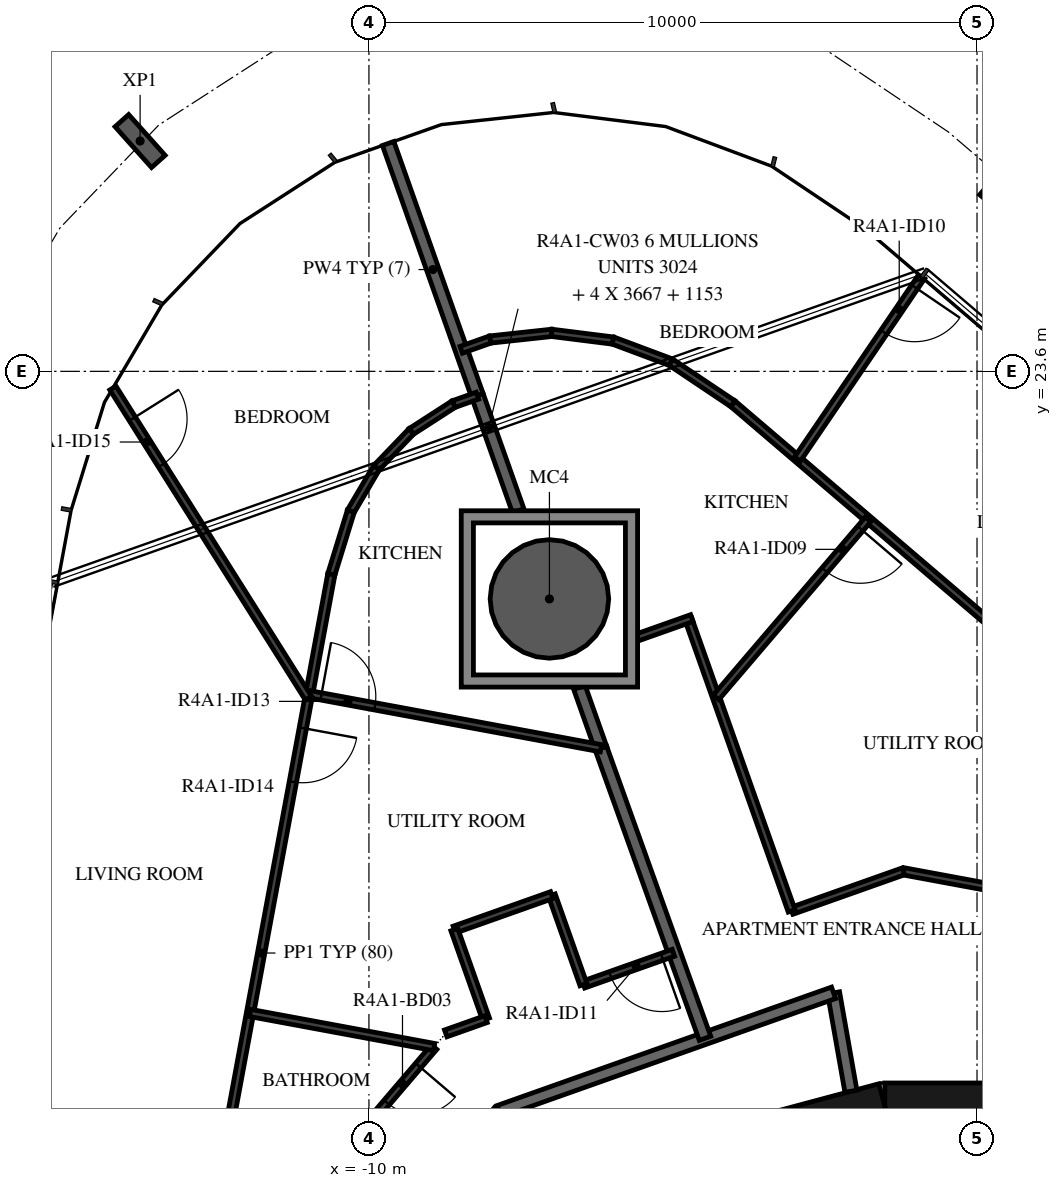
"""IFC4 building model, lengths in metres.
Left out: names, types, materials, properties, quantities, classifications, styles, units other than length and angle.
Written with IfcOpenShell. Run it as: python <this file> out.ifc"""

import sys

from ifc_helpers import new_model, si_unit, direction, frame, frame_2d, origin, origin_2d, place, context, subcontext, project, spatial, polyline, rectangle, hollow_circle, i_section, outline, extrude, element, fill, save


model = new_model("IFC4")
c1 = context("Model", 3, precision=1e-05, world=origin(), true_north=direction((0.0, 1.0)))
c2 = subcontext(c1, "Body", "Model", "MODEL_VIEW")
j1 = project(units=[si_unit("LENGTHUNIT", "METRE"), si_unit("PLANEANGLEUNIT", "RADIAN")], contexts=[c1])
p1 = place(None, origin())
s1 = spatial("IfcSite", under=j1, at=p1, CompositionType="ELEMENT")
p2 = place(p1, origin())
s2 = spatial("IfcBuilding", under=s1, at=p2, CompositionType="ELEMENT")
p3 = place(p2, frame((0.0, 0.0, 155.2)))
s3 = spatial("IfcBuildingStorey", under=s2, at=p3, CompositionType="ELEMENT", Elevation=155.2)
p4 = place(p3, frame((-7.032, 19.858, -0.38), z_axis=(0.0, 0.0, 1.0), x_axis=(1.0, 0.0, 0.0)))
e1 = element("IfcColumn", 1, at=p4, inside=s3, PredefinedType="COLUMN", context=c2, shape_type="SweptSolid", body=[
    extrude(hollow_circle(Radius=0.975, WallThickness=0.045, at=origin_2d()), origin(), (0.0, 0.0, 1.0), 3.5),
])
for number, where, z_axis, x_axis in (
    (2, (0.45, 26.75, -0.38), (0.0, 0.0, 1.0), (0.76, -0.649, 0.0)),
    (3, (-13.763, 27.387, -0.38), (0.0, 0.0, 1.0), (0.746, 0.666, 0.0)),
):
    element("IfcColumn", number, at=place(p3, frame(where, z_axis=z_axis, x_axis=x_axis)), inside=s3, PredefinedType="COLUMN", context=c2, shape_type="SweptSolid", body=[
        extrude(i_section(OverallWidth=0.3, OverallDepth=0.9, WebThickness=0.019, FlangeThickness=0.035, FilletRadius=0.03, at=origin_2d()), origin(), (0.0, 0.0, 1.0), 3.5),
    ])
for number, where, z_axis, x_axis in (
    (4, (1.516, 11.647, 0.0), (0.0, 0.0, 1.0), (-1.0, 0.0, 0.0)),
    (5, (-1.55, 11.643, 0.0), (0.0, 0.0, 1.0), (-0.966, -0.259, 0.0)),
):
    element("IfcWall", number, at=place(p3, frame(where, z_axis=z_axis, x_axis=x_axis)), inside=s3, PredefinedType="SHEAR", context=c2, shape_type="SweptSolid", body=[
        extrude(rectangle(XDim=3.033, YDim=0.5, at=frame_2d((1.516, 0.0))), origin(), (0.0, 0.0, 1.0), 3.12),
    ])
p5 = place(p3, frame((-2.074, 11.761, 0.0), z_axis=(0.0, 0.0, 1.0), x_axis=(-0.1736412798, 0.984808969267, 0.0)))
e6 = element("IfcWall", 6, at=p5, inside=s3, PredefinedType="STANDARD", context=c2, shape_type="SweptSolid", body=[
    extrude(rectangle(XDim=1.644, YDim=0.2, at=frame_2d((0.822, 0.0))), origin(), (0.0, 0.0, 1.0), 3.12),
])
p6 = place(p3, frame((-2.359, 13.38, 0.0), z_axis=(0.0, 0.0, 1.0), x_axis=(-0.942647529236, -0.333789807551, 0.0)))
e7 = element("IfcWall", 7, at=p6, inside=s3, PredefinedType="STANDARD", context=c2, shape_type="SweptSolid", body=[
    extrude(rectangle(XDim=5.833, YDim=0.2, at=frame_2d((2.917, 0.0))), origin(), (0.0, 0.0, 1.0), 3.12),
])
p7 = place(p3, frame((-7.858, 11.433, 0.0), z_axis=(0.0, 0.0, 1.0), x_axis=(-0.649440801937, -0.760412154545, 0.0)))
e8 = element("IfcWall", 8, at=p7, inside=s3, PredefinedType="STANDARD", context=c2, shape_type="SweptSolid", body=[
    extrude(rectangle(XDim=7.181, YDim=0.2, at=frame_2d((3.59, 0.0))), origin(), (0.0, 0.0, 1.0), 3.12),
])
p8 = place(p7, frame((2.6, 0.0, 0.0)))
e9 = element("IfcOpeningElement", 9, at=p8, cuts=e8, PredefinedType="OPENING", context=c2, shape_type="SweptSolid", body=[
    extrude(rectangle(XDim=1.0, YDim=2.1, at=frame_2d((0.5, 1.05))), frame((0.0, 0.11, 0.0), z_axis=(0.0, -1.0, 0.0), x_axis=(1.0, 0.0, 0.0)), (0.0, 0.0, 1.0), 0.22),
])
p9 = place(p3, frame((-6.185, 17.402, 0.0), z_axis=(0.0, 0.0, 1.0), x_axis=(0.337736730281, -0.941240618024, 0.0)))
e10 = element("IfcWall", 10, at=p9, inside=s3, PredefinedType="STANDARD", context=c2, shape_type="SweptSolid", body=[
    extrude(rectangle(XDim=5.068, YDim=0.2, at=frame_2d((2.534, 0.0))), origin(), (0.0, 0.0, 1.0), 3.12),
])
p10 = place(p3, frame((-6.539, 18.403, 0.0), z_axis=(0.0, 0.0, 1.0), x_axis=(0.333625806098, -0.942705585804, 0.0)))
e11 = element("IfcWall", 11, at=p10, inside=s3, PredefinedType="STANDARD", context=c2, shape_type="SweptSolid", body=[
    extrude(rectangle(XDim=1.062, YDim=0.2, at=frame_2d((0.531, 0.0))), origin(), (0.0, 0.0, 1.0), 3.12),
])
p11 = place(p3, frame((-9.684, 27.348, 0.0), z_axis=(0.0, 0.0, 1.0), x_axis=(0.333818381408, -0.942637410797, 0.0)))
e12 = element("IfcWall", 12, at=p11, inside=s3, PredefinedType="STANDARD", context=c2, shape_type="SweptSolid", body=[
    extrude(rectangle(XDim=4.4, YDim=0.2, at=frame_2d((2.2, 0.0))), origin(), (0.0, 0.0, 1.0), 3.12),
])
p12 = place(p3, frame((-8.216, 23.2, 0.0), z_axis=(0.0, 0.0, 1.0), x_axis=(0.333793117913, -0.942646357036, 0.0)))
e13 = element("IfcWall", 13, at=p12, inside=s3, PredefinedType="STANDARD", context=c2, shape_type="SweptSolid", body=[
    extrude(rectangle(XDim=2.008, YDim=0.2, at=frame_2d((1.004, 0.0))), origin(), (0.0, 0.0, 1.0), 3.12),
])
p13 = place(p3, frame((8.702, 12.206, 0.0), z_axis=(0.0, 0.0, 1.0), x_axis=(-0.760401313718, 0.649453494945, 0.0)))
e14 = element("IfcWall", 14, at=p13, inside=s3, PredefinedType="PARTITIONING", context=c2, shape_type="SweptSolid", body=[
    extrude(rectangle(XDim=16.724, YDim=0.12, at=frame_2d((8.362, 0.0))), origin(), (0.0, 0.0, 1.0), 3.12),
])
p14 = place(p13, frame((0.2, 0.0, 0.0)))
e15 = element("IfcOpeningElement", 15, at=p14, cuts=e14, PredefinedType="OPENING", context=c2, shape_type="SweptSolid", body=[
    extrude(rectangle(XDim=0.9, YDim=2.1, at=frame_2d((0.45, 1.05))), frame((0.0, 0.07, 0.0), z_axis=(0.0, -1.0, 0.0), x_axis=(1.0, 0.0, 0.0)), (0.0, 0.0, 1.0), 0.14),
])
p15 = place(p13, frame((7.099, 0.0, 0.0)))
e16 = element("IfcOpeningElement", 16, at=p15, cuts=e14, PredefinedType="OPENING", context=c2, shape_type="SweptSolid", body=[
    extrude(rectangle(XDim=0.9, YDim=2.1, at=frame_2d((0.45, 1.05))), frame((0.0, 0.07, 0.0), z_axis=(0.0, -1.0, 0.0), x_axis=(1.0, 0.0, 0.0)), (0.0, 0.0, 1.0), 0.14),
])
p16 = place(p3, frame((6.641, 13.923, 0.0), z_axis=(0.0, 0.0, 1.0), x_axis=(-0.983250157272, 0.182261153912, 0.0)))
e17 = element("IfcWall", 17, at=p16, inside=s3, PredefinedType="PARTITIONING", context=c2, shape_type="SweptSolid", body=[
    extrude(rectangle(XDim=7.985, YDim=0.12, at=frame_2d((3.992, 0.0))), origin(), (0.0, 0.0, 1.0), 3.12),
])
p17 = place(p16, frame((1.4, 0.0, 0.0)))
e18 = element("IfcOpeningElement", 18, at=p17, cuts=e17, PredefinedType="OPENING", context=c2, shape_type="SweptSolid", body=[
    extrude(rectangle(XDim=0.8, YDim=2.1, at=frame_2d((0.4, 1.05))), frame((0.0, 0.07, 0.0), z_axis=(0.0, -1.0, 0.0), x_axis=(1.0, 0.0, 0.0)), (0.0, 0.0, 1.0), 0.14),
])
p18 = place(p16, frame((5.069, 0.0, 0.0)))
e19 = element("IfcOpeningElement", 19, at=p18, cuts=e17, PredefinedType="OPENING", context=c2, shape_type="SweptSolid", body=[
    extrude(rectangle(XDim=0.9, YDim=2.1, at=frame_2d((0.45, 1.05))), frame((0.0, 0.07, 0.0), z_axis=(0.0, -1.0, 0.0), x_axis=(1.0, 0.0, 0.0)), (0.0, 0.0, 1.0), 0.14),
])
p19 = place(p3, frame((-1.21, 15.378, 0.0), z_axis=(0.0, 0.0, 1.0), x_axis=(-0.942633792474, -0.333828598663, 0.0)))
e20 = element("IfcWall", 20, at=p19, inside=s3, PredefinedType="PARTITIONING", context=c2, shape_type="SweptSolid", body=[
    extrude(rectangle(XDim=1.95, YDim=0.12, at=frame_2d((0.975, 0.0))), origin(), (0.0, 0.0, 1.0), 3.12),
])
p20 = place(p3, frame((-3.048, 14.727, 0.0), z_axis=(0.0, 0.0, 1.0), x_axis=(-0.333811603187, 0.942639811157, 0.0)))
e21 = element("IfcWall", 21, at=p20, inside=s3, PredefinedType="PARTITIONING", context=c2, shape_type="SweptSolid", body=[
    extrude(rectangle(XDim=5.087, YDim=0.12, at=frame_2d((2.543, 0.0))), origin(), (0.0, 0.0, 1.0), 3.12),
])
p21 = place(p3, frame((-4.689, 19.542, 0.0), z_axis=(0.0, 0.0, 1.0), x_axis=(-0.942661851862, -0.33374935662, 0.0)))
e22 = element("IfcWall", 22, at=p21, inside=s3, PredefinedType="PARTITIONING", context=c2, shape_type="SweptSolid", body=[
    extrude(rectangle(XDim=1.017, YDim=0.12, at=frame_2d((0.508, 0.0))), origin(), (0.0, 0.0, 1.0), 3.12),
])
p22 = place(p3, frame((-0.914, 25.153, 0.0), z_axis=(0.0, 0.0, 1.0), x_axis=(-0.56264004133, -0.826701992191, 0.0)))
e23 = element("IfcWall", 23, at=p22, inside=s3, PredefinedType="PARTITIONING", context=c2, shape_type="SweptSolid", body=[
    extrude(rectangle(XDim=3.622, YDim=0.12, at=frame_2d((1.811, 0.0))), origin(), (0.0, 0.0, 1.0), 2.73),
])
p23 = place(p22, frame((0.2, 0.0, 0.0)))
e24 = element("IfcOpeningElement", 24, at=p23, cuts=e23, PredefinedType="OPENING", context=c2, shape_type="SweptSolid", body=[
    extrude(rectangle(XDim=0.9, YDim=2.1, at=frame_2d((0.45, 1.05))), frame((0.0, 0.07, 0.0), z_axis=(0.0, -1.0, 0.0), x_axis=(1.0, 0.0, 0.0)), (0.0, 0.0, 1.0), 0.14),
])
p24 = place(p3, frame((-1.79, 21.167, 0.0), z_axis=(0.0, 0.0, 1.0), x_axis=(-0.649427819186, -0.760423242456, 0.0)))
e25 = element("IfcWall", 25, at=p24, inside=s3, PredefinedType="PARTITIONING", context=c2, shape_type="SweptSolid", body=[
    extrude(rectangle(XDim=3.851, YDim=0.12, at=frame_2d((1.926, 0.0))), origin(), (0.0, 0.0, 1.0), 3.12),
])
p25 = place(p24, frame((0.2, 0.0, 0.0)))
e26 = element("IfcOpeningElement", 26, at=p25, cuts=e25, PredefinedType="OPENING", context=c2, shape_type="SweptSolid", body=[
    extrude(rectangle(XDim=0.9, YDim=2.1, at=frame_2d((0.45, 1.05))), frame((0.0, 0.07, 0.0), z_axis=(0.0, -1.0, 0.0), x_axis=(1.0, 0.0, 0.0)), (0.0, 0.0, 1.0), 0.14),
])
p26 = place(p3, frame((-8.483, 23.954, 0.0), z_axis=(0.0, 0.0, 1.0), x_axis=(0.942554725445, 0.334051776738, 0.0)))
e27 = element("IfcWall", 27, at=p26, inside=s3, PredefinedType="PARTITIONING", context=c2, shape_type="SweptSolid", body=[
    extrude(rectangle(XDim=0.508, YDim=0.12, at=frame_2d((0.254, 0.0))), origin(), (0.0, 0.0, 1.0), 3.12),
])
p27 = place(p3, frame((-8.004, 24.124, 0.0), z_axis=(0.0, 0.0, 1.0), x_axis=(0.994216064839, 0.107398400431, 0.0)))
e28 = element("IfcWall", 28, at=p27, inside=s3, PredefinedType="PARTITIONING", context=c2, shape_type="SweptSolid", body=[
    extrude(rectangle(XDim=1.016, YDim=0.12, at=frame_2d((0.508, 0.0))), origin(), (0.0, 0.0, 1.0), 3.12),
])
p28 = place(p3, frame((-6.994, 24.233, 0.0), z_axis=(0.0, 0.0, 1.0), x_axis=(0.992188875952, -0.124744676991, 0.0)))
e29 = element("IfcWall", 29, at=p28, inside=s3, PredefinedType="PARTITIONING", context=c2, shape_type="SweptSolid", body=[
    extrude(rectangle(XDim=1.016, YDim=0.12, at=frame_2d((0.508, 0.0))), origin(), (0.0, 0.0, 1.0), 3.12),
])
p29 = place(p3, frame((-5.986, 24.106, 0.0), z_axis=(0.0, 0.0, 1.0), x_axis=(0.936625084254, -0.350333343469, 0.0)))
e30 = element("IfcWall", 30, at=p29, inside=s3, PredefinedType="PARTITIONING", context=c2, shape_type="SweptSolid", body=[
    extrude(rectangle(XDim=1.016, YDim=0.12, at=frame_2d((0.508, 0.0))), origin(), (0.0, 0.0, 1.0), 3.12),
])
p30 = place(p3, frame((-5.034, 23.75, 0.0), z_axis=(0.0, 0.0, 1.0), x_axis=(0.83070096574, -0.556718874764, 0.0)))
e31 = element("IfcWall", 31, at=p30, inside=s3, PredefinedType="PARTITIONING", context=c2, shape_type="SweptSolid", body=[
    extrude(rectangle(XDim=1.227, YDim=0.12, at=frame_2d((0.614, 0.0))), origin(), (0.0, 0.0, 1.0), 3.12),
])
p31 = place(p3, frame((-4.993, 14.038, 0.0), z_axis=(0.0, 0.0, 1.0), x_axis=(-0.942685371668, -0.333682918418, 0.0)))
e32 = element("IfcWall", 32, at=p31, inside=s3, PredefinedType="PARTITIONING", context=c2, shape_type="SweptSolid", body=[
    extrude(rectangle(XDim=1.569, YDim=0.12, at=frame_2d((0.784, 0.0))), origin(), (0.0, 0.0, 1.0), 3.12),
])
p32 = place(p31, frame((0.2, 0.0, 0.0)))
e33 = element("IfcOpeningElement", 33, at=p32, cuts=e32, PredefinedType="OPENING", context=c2, shape_type="SweptSolid", body=[
    extrude(rectangle(XDim=0.9, YDim=2.1, at=frame_2d((0.45, 1.05))), frame((0.0, 0.07, 0.0), z_axis=(0.0, -1.0, 0.0), x_axis=(1.0, 0.0, 0.0)), (0.0, 0.0, 1.0), 0.14),
])
p33 = place(p3, frame((-6.472, 13.515, 0.0), z_axis=(0.0, 0.0, 1.0), x_axis=(-0.333809516424, 0.942640550127, 0.0)))
e34 = element("IfcWall", 34, at=p33, inside=s3, PredefinedType="PARTITIONING", context=c2, shape_type="SweptSolid", body=[
    extrude(rectangle(XDim=1.562, YDim=0.12, at=frame_2d((0.781, 0.0))), origin(), (0.0, 0.0, 1.0), 3.12),
])
p34 = place(p3, frame((-6.993, 14.987, 0.0), z_axis=(0.0, 0.0, 1.0), x_axis=(-0.942599915297, -0.33392424243, 0.0)))
e35 = element("IfcWall", 35, at=p34, inside=s3, PredefinedType="PARTITIONING", context=c2, shape_type="SweptSolid", body=[
    extrude(rectangle(XDim=1.7, YDim=0.12, at=frame_2d((0.85, 0.0))), origin(), (0.0, 0.0, 1.0), 3.12),
])
p35 = place(p3, frame((-8.596, 14.419, 0.0), z_axis=(0.0, 0.0, 1.0), x_axis=(0.333670576497, -0.942689740254, 0.0)))
e36 = element("IfcWall", 36, at=p35, inside=s3, PredefinedType="PARTITIONING", context=c2, shape_type="SweptSolid", body=[
    extrude(rectangle(XDim=1.562, YDim=0.12, at=frame_2d((0.781, 0.0))), origin(), (0.0, 0.0, 1.0), 3.12),
])
p36 = place(p3, frame((-8.075, 12.947, 0.0), z_axis=(0.0, 0.0, 1.0), x_axis=(-0.942649994227, -0.33378284615, 0.0)))
e37 = element("IfcWall", 37, at=p36, inside=s3, PredefinedType="PARTITIONING", context=c2, shape_type="SweptSolid", body=[
    extrude(rectangle(XDim=0.703, YDim=0.12, at=frame_2d((0.352, 0.0))), origin(), (0.0, 0.0, 1.0), 3.12),
])
p37 = place(p3, frame((-8.929, 12.488, 0.0), z_axis=(0.0, 0.0, 1.0), x_axis=(-0.64944646045, -0.760407321775, 0.0)))
e38 = element("IfcWall", 38, at=p37, inside=s3, PredefinedType="PARTITIONING", context=c2, shape_type="SweptSolid", body=[
    extrude(rectangle(XDim=7.69, YDim=0.12, at=frame_2d((3.845, 0.0))), origin(), (0.0, 0.0, 1.0), 3.12),
])
p38 = place(p37, frame((0.4, 0.0, 0.0)))
e39 = element("IfcOpeningElement", 39, at=p38, cuts=e38, PredefinedType="OPENING", context=c2, shape_type="SweptSolid", body=[
    extrude(rectangle(XDim=0.8, YDim=2.1, at=frame_2d((0.4, 1.05))), frame((0.0, 0.07, 0.0), z_axis=(0.0, -1.0, 0.0), x_axis=(1.0, 0.0, 0.0)), (0.0, 0.0, 1.0), 0.14),
])
p39 = place(p37, frame((6.356, 0.0, 0.0)))
e40 = element("IfcOpeningElement", 40, at=p39, cuts=e38, PredefinedType="OPENING", context=c2, shape_type="SweptSolid", body=[
    extrude(rectangle(XDim=0.9, YDim=2.1, at=frame_2d((0.45, 1.05))), frame((0.0, 0.07, 0.0), z_axis=(0.0, -1.0, 0.0), x_axis=(1.0, 0.0, 0.0)), (0.0, 0.0, 1.0), 0.14),
])
p40 = place(p3, frame((-8.216, 23.2, 0.0), z_axis=(0.0, 0.0, 1.0), x_axis=(-0.942565413363, -0.33402161836, 0.0)))
e41 = element("IfcWall", 41, at=p40, inside=s3, PredefinedType="PARTITIONING", context=c2, shape_type="SweptSolid", body=[
    extrude(rectangle(XDim=0.414, YDim=0.12, at=frame_2d((0.207, 0.0))), origin(), (0.0, 0.0, 1.0), 3.12),
])
for number, where, z_axis, x_axis in (
    (42, (-8.606, 23.062, 0.0), (0.0, 0.0, 1.0), (-0.84, -0.542, 0.0)),
    (43, (-9.303, 22.612, 0.0), (0.0, 0.0, 1.0), (-0.693, -0.721, 0.0)),
    (44, (-9.877, 22.014, 0.0), (0.0, 0.0, 1.0), (-0.508, -0.861, 0.0)),
):
    element("IfcWall", number, at=place(p3, frame(where, z_axis=z_axis, x_axis=x_axis)), inside=s3, PredefinedType="PARTITIONING", context=c2, shape_type="SweptSolid", body=[
        extrude(rectangle(XDim=0.829, YDim=0.12, at=frame_2d((0.415, 0.0))), origin(), (0.0, 0.0, 1.0), 3.12),
    ])
p41 = place(p3, frame((-10.298, 21.3, 0.0), z_axis=(0.0, 0.0, 1.0), x_axis=(-0.295127342945, -0.955457927617, 0.0)))
e45 = element("IfcWall", 45, at=p41, inside=s3, PredefinedType="PARTITIONING", context=c2, shape_type="SweptSolid", body=[
    extrude(rectangle(XDim=1.087, YDim=0.12, at=frame_2d((0.543, 0.0))), origin(), (0.0, 0.0, 1.0), 3.12),
])
p42 = place(p3, frame((-10.618, 20.262, 0.0), z_axis=(0.0, 0.0, 1.0), x_axis=(-0.182222468274, -0.983257327487, 0.0)))
e46 = element("IfcWall", 46, at=p42, inside=s3, PredefinedType="PARTITIONING", context=c2, shape_type="SweptSolid", body=[
    extrude(rectangle(XDim=12.667, YDim=0.12, at=frame_2d((6.333, 0.0))), origin(), (0.0, 0.0, 1.0), 3.12),
])
p43 = place(p42, frame((2.57, 0.0, 0.0)))
e47 = element("IfcOpeningElement", 47, at=p43, cuts=e46, PredefinedType="OPENING", context=c2, shape_type="SweptSolid", body=[
    extrude(rectangle(XDim=0.9, YDim=2.1, at=frame_2d((0.45, 1.05))), frame((0.0, 0.07, 0.0), z_axis=(0.0, -1.0, 0.0), x_axis=(1.0, 0.0, 0.0)), (0.0, 0.0, 1.0), 0.14),
])
p44 = place(p3, frame((-10.984, 18.291, 0.0), z_axis=(0.0, 0.0, 1.0), x_axis=(0.98324782266, -0.182273748068, 0.0)))
e48 = element("IfcWall", 48, at=p44, inside=s3, PredefinedType="PARTITIONING", context=c2, shape_type="SweptSolid", body=[
    extrude(rectangle(XDim=4.881, YDim=0.12, at=frame_2d((2.44, 0.0))), origin(), (0.0, 0.0, 1.0), 3.12),
])
p45 = place(p44, frame((0.2, 0.0, 0.0)))
e49 = element("IfcOpeningElement", 49, at=p45, cuts=e48, PredefinedType="OPENING", context=c2, shape_type="SweptSolid", body=[
    extrude(rectangle(XDim=0.9, YDim=2.1, at=frame_2d((0.45, 1.05))), frame((0.0, 0.07, 0.0), z_axis=(0.0, -1.0, 0.0), x_axis=(1.0, 0.0, 0.0)), (0.0, 0.0, 1.0), 0.14),
])
p46 = place(p3, frame((-14.211, 23.326, 0.0), z_axis=(0.0, 0.0, 1.0), x_axis=(0.533278244906, -0.845939899467, 0.0)))
e50 = element("IfcWall", 50, at=p46, inside=s3, PredefinedType="PARTITIONING", context=c2, shape_type="SweptSolid", body=[
    extrude(rectangle(XDim=6.029, YDim=0.12, at=frame_2d((3.014, 0.0))), origin(), (0.0, 0.0, 1.0), 3.12),
])
p47 = place(p46, frame((0.6, 0.0, 0.0)))
e51 = element("IfcOpeningElement", 51, at=p47, cuts=e50, PredefinedType="OPENING", context=c2, shape_type="SweptSolid", body=[
    extrude(rectangle(XDim=0.9, YDim=2.1, at=frame_2d((0.45, 1.05))), frame((0.0, 0.07, 0.0), z_axis=(0.0, -1.0, 0.0), x_axis=(1.0, 0.0, 0.0)), (0.0, 0.0, 1.0), 0.14),
])
p48 = place(p3, frame((-11.955, 13.049, 0.0), z_axis=(0.0, 0.0, 1.0), x_axis=(0.983247271586, -0.182276720725, 0.0)))
e52 = element("IfcWall", 52, at=p48, inside=s3, PredefinedType="PARTITIONING", context=c2, shape_type="SweptSolid", body=[
    extrude(rectangle(XDim=3.078, YDim=0.12, at=frame_2d((1.539, 0.0))), origin(), (0.0, 0.0, 1.0), 3.12),
])
p49 = place(p3, frame((-16.552, 12.394, 0.0), z_axis=(0.0, 0.0, 1.0), x_axis=(0.760425586578, -0.649425074414, 0.0)))
e53 = element("IfcWall", 53, at=p49, inside=s3, PredefinedType="PARTITIONING", context=c2, shape_type="SweptSolid", body=[
    extrude(rectangle(XDim=5.081, YDim=0.12, at=frame_2d((2.541, 0.0))), origin(), (0.0, 0.0, 1.0), 3.12),
])
p50 = place(p3, origin())
e54 = element("IfcWall", 54, at=p50, inside=s3, PredefinedType="STANDARD", context=c2, shape_type="SweptSolid", body=[
    extrude(outline(polyline([(-5.582, 21.308), (-5.582, 18.408), (-8.482, 18.408), (-8.482, 21.308), (-5.582, 21.308)]), holes=[polyline([(-8.282, 18.608), (-5.782, 18.608), (-5.782, 21.108), (-8.282, 21.108), (-8.282, 18.608)])]), origin(), (0.0, 0.0, 1.0), 3.12),
])
p51 = place(p25, origin())
e55 = element("IfcDoor", 55, at=p51, inside=s3, OperationType="SINGLE_SWING_RIGHT", PredefinedType="DOOR", context=c2, shape_type="SweptSolid", body=[
    extrude(rectangle(XDim=0.9, YDim=2.1, at=frame_2d((0.45, 1.05))), frame((0.0, 0.025, 0.0), z_axis=(0.0, -1.0, 0.0), x_axis=(1.0, 0.0, 0.0)), (0.0, 0.0, 1.0), 0.05),
])
fill(e26, e55)
p52 = place(p23, origin())
e56 = element("IfcDoor", 56, at=p52, inside=s3, OperationType="SINGLE_SWING_RIGHT", PredefinedType="DOOR", context=c2, shape_type="SweptSolid", body=[
    extrude(rectangle(XDim=0.9, YDim=2.1, at=frame_2d((0.45, 1.05))), frame((0.0, 0.025, 0.0), z_axis=(0.0, -1.0, 0.0), x_axis=(1.0, 0.0, 0.0)), (0.0, 0.0, 1.0), 0.05),
])
fill(e24, e56)
p53 = place(p32, origin())
e57 = element("IfcDoor", 57, at=p53, inside=s3, OperationType="SINGLE_SWING_LEFT", PredefinedType="DOOR", context=c2, shape_type="SweptSolid", body=[
    extrude(rectangle(XDim=0.9, YDim=2.1, at=frame_2d((0.45, 1.05))), frame((0.0, 0.025, 0.0), z_axis=(0.0, -1.0, 0.0), x_axis=(1.0, 0.0, 0.0)), (0.0, 0.0, 1.0), 0.05),
])
fill(e33, e57)
p54 = place(p38, origin())
e58 = element("IfcDoor", 58, at=p54, inside=s3, OperationType="SINGLE_SWING_LEFT", PredefinedType="DOOR", context=c2, shape_type="SweptSolid", body=[
    extrude(rectangle(XDim=0.8, YDim=2.1, at=frame_2d((0.4, 1.05))), frame((0.0, 0.025, 0.0), z_axis=(0.0, -1.0, 0.0), x_axis=(1.0, 0.0, 0.0)), (0.0, 0.0, 1.0), 0.05),
])
fill(e39, e58)
p55 = place(p45, origin())
e59 = element("IfcDoor", 59, at=p55, inside=s3, OperationType="SINGLE_SWING_LEFT", PredefinedType="DOOR", context=c2, shape_type="SweptSolid", body=[
    extrude(rectangle(XDim=0.9, YDim=2.1, at=frame_2d((0.45, 1.05))), frame((0.0, 0.025, 0.0), z_axis=(0.0, -1.0, 0.0), x_axis=(1.0, 0.0, 0.0)), (0.0, 0.0, 1.0), 0.05),
])
fill(e49, e59)
p56 = place(p43, origin())
e60 = element("IfcDoor", 60, at=p56, inside=s3, OperationType="SINGLE_SWING_LEFT", PredefinedType="DOOR", context=c2, shape_type="SweptSolid", body=[
    extrude(rectangle(XDim=0.9, YDim=2.1, at=frame_2d((0.45, 1.05))), frame((0.0, 0.025, 0.0), z_axis=(0.0, -1.0, 0.0), x_axis=(1.0, 0.0, 0.0)), (0.0, 0.0, 1.0), 0.05),
])
fill(e47, e60)
p57 = place(p47, origin())
e61 = element("IfcDoor", 61, at=p57, inside=s3, OperationType="SINGLE_SWING_LEFT", PredefinedType="DOOR", context=c2, shape_type="SweptSolid", body=[
    extrude(rectangle(XDim=0.9, YDim=2.1, at=frame_2d((0.45, 1.05))), frame((0.0, 0.025, 0.0), z_axis=(0.0, -1.0, 0.0), x_axis=(1.0, 0.0, 0.0)), (0.0, 0.0, 1.0), 0.05),
])
fill(e51, e61)
save(model, sys.argv[1])
